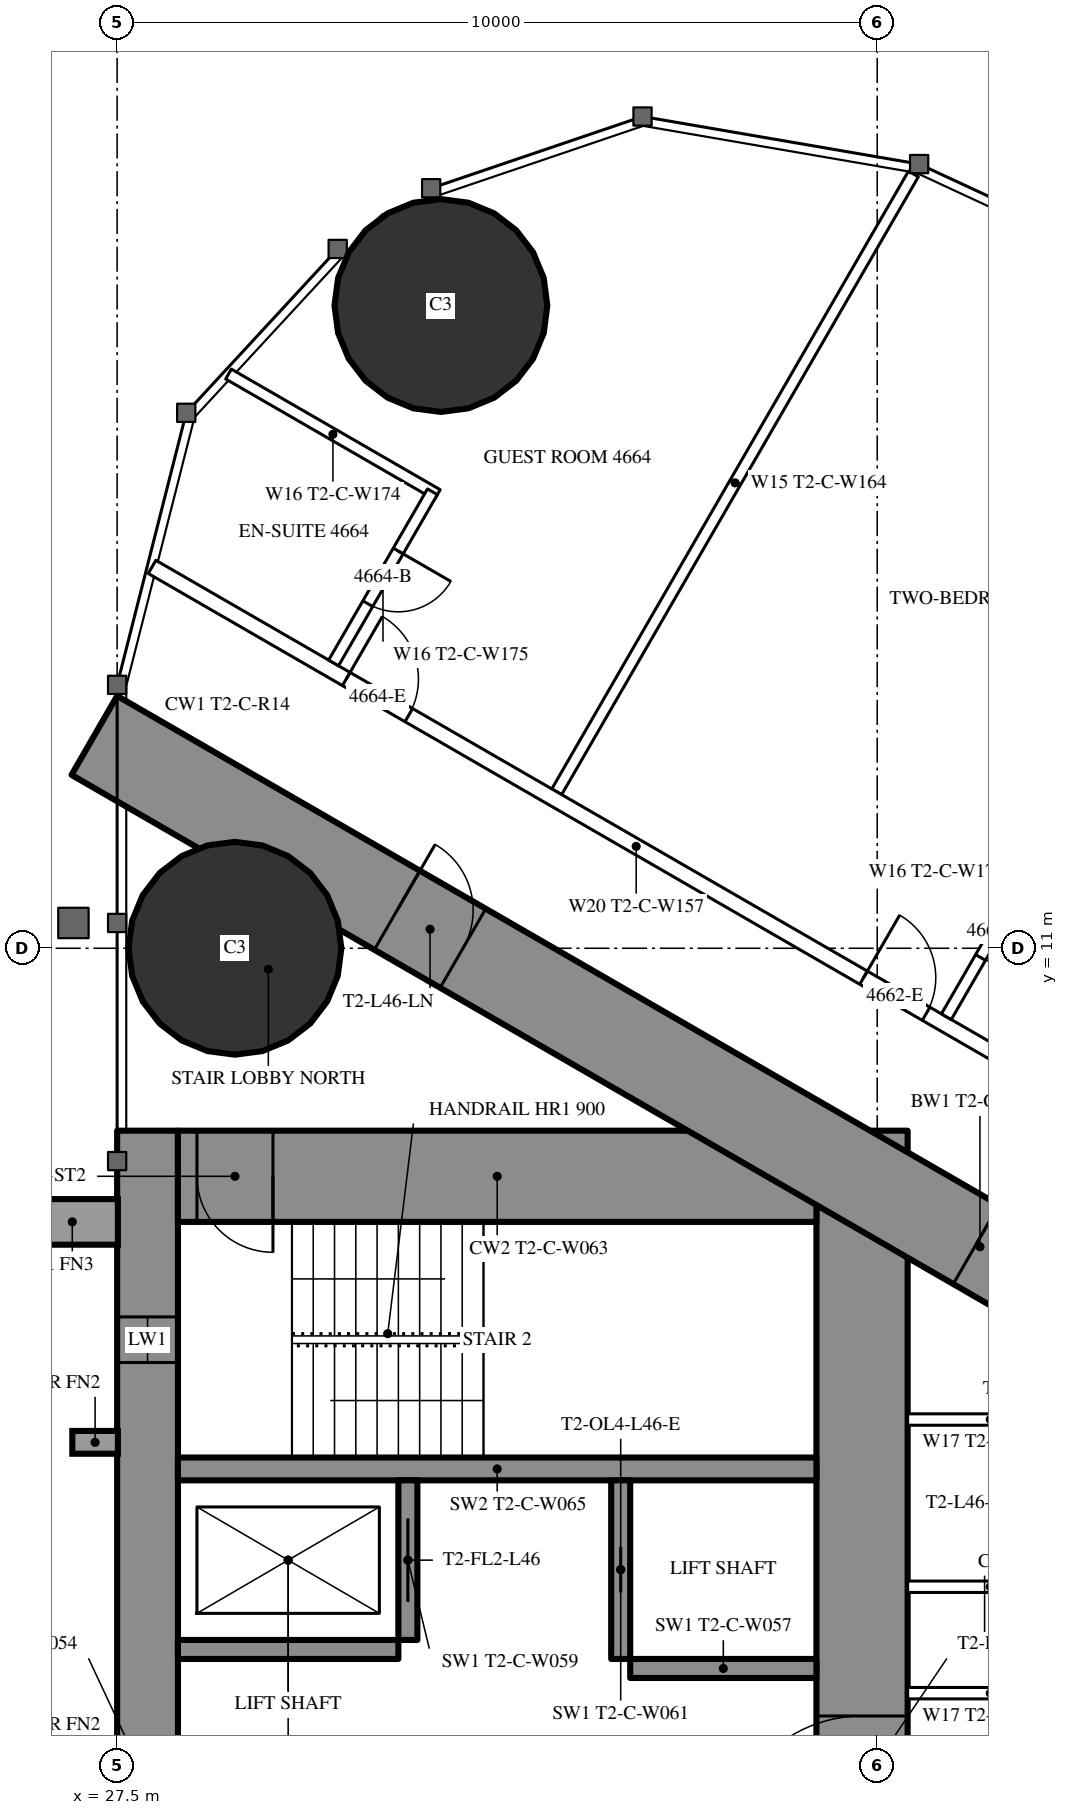
"""IFC4 building model, lengths in metres.
Left out: names, types, materials, properties, quantities, classifications, styles, units other than length and angle.
Written with IfcOpenShell. Run it as: python <this file> out.ifc"""

import sys

from ifc_helpers import new_model, si_unit, direction, frame, frame_2d, origin, origin_2d, place, context, subcontext, project, spatial, rectangle, circle, extrude, element, fill, save


model = new_model("IFC4")
c1 = context("Model", 3, precision=1e-05, world=origin(), true_north=direction((0.0, 1.0)))
c2 = subcontext(c1, "Body", "Model", "MODEL_VIEW")
j1 = project(units=[si_unit("LENGTHUNIT", "METRE"), si_unit("PLANEANGLEUNIT", "RADIAN")], contexts=[c1])
p1 = place(None, origin())
s1 = spatial("IfcSite", under=j1, at=p1, CompositionType="ELEMENT")
p2 = place(p1, origin())
s2 = spatial("IfcBuilding", under=s1, at=p2, CompositionType="ELEMENT")
p3 = place(p2, frame((0.0, 0.0, 173.8)))
s3 = spatial("IfcBuildingStorey", under=s2, at=p3, CompositionType="ELEMENT", Elevation=173.8)
for number, where, z_axis, x_axis in (
    (1, (31.76, 19.456, 0.0), (0.0, 0.0, 1.0), (1.0, 0.0, 0.0)),
    (2, (29.05, 11.0, 0.0), (0.0, 0.0, 1.0), (1.0, 0.0, 0.0)),
):
    element("IfcColumn", number, at=place(p3, frame(where, z_axis=z_axis, x_axis=x_axis)), inside=s3, PredefinedType="COLUMN", context=c2, shape_type="SweptSolid", body=[
        extrude(circle(Radius=1.4, at=origin_2d()), origin(), (0.0, 0.0, 1.0), 3.5),
    ])
p4 = place(p3, frame((27.9, -8.6, 0.0), z_axis=(0.0, 0.0, 1.0), x_axis=(0.0, 1.0, 0.0)))
e3 = element("IfcWall", 3, at=p4, inside=s3, PredefinedType="SHEAR", context=c2, shape_type="SweptSolid", body=[
    extrude(rectangle(XDim=17.2, YDim=0.8, at=frame_2d((8.6, 0.0))), origin(), (0.0, 0.0, 1.0), 3.5),
])
p5 = place(p4, frame((2.45, 0.0, 0.6)))
e4 = element("IfcOpeningElement", 4, at=p5, cuts=e3, PredefinedType="OPENING", context=c2, shape_type="SweptSolid", body=[
    extrude(rectangle(XDim=0.6, YDim=2.1, at=frame_2d((0.3, 1.05))), frame((0.0, 0.41, 0.0), z_axis=(0.0, -1.0, 0.0), x_axis=(1.0, 0.0, 0.0)), (0.0, 0.0, 1.0), 0.82),
])
p6 = place(p4, frame((14.15, 0.0, 0.6)))
e5 = element("IfcOpeningElement", 5, at=p6, cuts=e3, PredefinedType="OPENING", context=c2, shape_type="SweptSolid", body=[
    extrude(rectangle(XDim=0.6, YDim=2.1, at=frame_2d((0.3, 1.05))), frame((0.0, 0.41, 0.0), z_axis=(0.0, -1.0, 0.0), x_axis=(1.0, 0.0, 0.0)), (0.0, 0.0, 1.0), 0.82),
])
p7 = place(p3, frame((37.3, -8.6, 0.0), z_axis=(0.0, 0.0, 1.0), x_axis=(0.0, 1.0, 0.0)))
e6 = element("IfcWall", 6, at=p7, inside=s3, PredefinedType="SHEAR", context=c2, shape_type="SweptSolid", body=[
    extrude(rectangle(XDim=17.2, YDim=1.2, at=frame_2d((8.6, 0.0))), origin(), (0.0, 0.0, 1.0), 3.5),
])
p8 = place(p7, frame((7.7, 0.0, 0.0)))
e7 = element("IfcOpeningElement", 7, at=p8, cuts=e6, PredefinedType="OPENING", context=c2, shape_type="SweptSolid", body=[
    extrude(rectangle(XDim=1.8, YDim=2.2, at=frame_2d((0.9, 1.1))), frame((0.0, 0.61, 0.0), z_axis=(0.0, -1.0, 0.0), x_axis=(1.0, 0.0, 0.0)), (0.0, 0.0, 1.0), 1.22),
])
p9 = place(p3, frame((28.3, 8.0, 0.0), z_axis=(0.0, 0.0, 1.0), x_axis=(1.0, 0.0, 0.0)))
e8 = element("IfcWall", 8, at=p9, inside=s3, PredefinedType="SHEAR", context=c2, shape_type="SweptSolid", body=[
    extrude(rectangle(XDim=8.4, YDim=1.2, at=frame_2d((4.2, 0.0))), origin(), (0.0, 0.0, 1.0), 3.5),
])
p10 = place(p9, frame((0.25, 0.0, 0.0)))
e9 = element("IfcOpeningElement", 9, at=p10, cuts=e8, PredefinedType="OPENING", context=c2, shape_type="SweptSolid", body=[
    extrude(rectangle(XDim=1.0, YDim=2.2, at=frame_2d((0.5, 1.1))), frame((0.0, 0.61, 0.0), z_axis=(0.0, -1.0, 0.0), x_axis=(1.0, 0.0, 0.0)), (0.0, 0.0, 1.0), 1.22),
])
p11 = place(p3, frame((28.3, 4.15, 0.0), z_axis=(0.0, 0.0, 1.0), x_axis=(1.0, 0.0, 0.0)))
e10 = element("IfcWall", 10, at=p11, inside=s3, PredefinedType="SHEAR", context=c2, shape_type="SweptSolid", body=[
    extrude(rectangle(XDim=8.4, YDim=0.3, at=frame_2d((4.2, 0.0))), origin(), (0.0, 0.0, 1.0), 3.5),
])
p12 = place(p3, frame((31.325, 1.9, 0.0), z_axis=(0.0, 0.0, 1.0), x_axis=(0.0, 1.0, 0.0)))
e11 = element("IfcWall", 11, at=p12, inside=s3, PredefinedType="SHEAR", context=c2, shape_type="SweptSolid", body=[
    extrude(rectangle(XDim=2.1, YDim=0.25, at=frame_2d((1.05, 0.0))), origin(), (0.0, 0.0, 1.0), 3.5),
])
p13 = place(p12, frame((0.5, 0.0, 0.0)))
e12 = element("IfcOpeningElement", 12, at=p13, cuts=e11, PredefinedType="OPENING", context=c2, shape_type="SweptSolid", body=[
    extrude(rectangle(XDim=1.1, YDim=2.2, at=frame_2d((0.55, 1.1))), frame((0.0, 0.135, 0.0), z_axis=(0.0, -1.0, 0.0), x_axis=(1.0, 0.0, 0.0)), (0.0, 0.0, 1.0), 0.27),
])
p14 = place(p3, frame((34.125, 1.65, 0.0), z_axis=(0.0, 0.0, 1.0), x_axis=(0.0, 1.0, 0.0)))
e13 = element("IfcWall", 13, at=p14, inside=s3, PredefinedType="SHEAR", context=c2, shape_type="SweptSolid", body=[
    extrude(rectangle(XDim=2.35, YDim=0.25, at=frame_2d((1.175, 0.0))), origin(), (0.0, 0.0, 1.0), 3.5),
])
p15 = place(p14, frame((0.875, 0.0, 0.0)))
e14 = element("IfcOpeningElement", 14, at=p15, cuts=e13, PredefinedType="OPENING", context=c2, shape_type="SweptSolid", body=[
    extrude(rectangle(XDim=0.6, YDim=2.0, at=frame_2d((0.3, 1.0))), frame((0.0, 0.135, 0.0), z_axis=(0.0, -1.0, 0.0), x_axis=(1.0, 0.0, 0.0)), (0.0, 0.0, 1.0), 0.27),
])
p16 = place(p3, frame((28.3, 1.775, 0.0), z_axis=(0.0, 0.0, 1.0), x_axis=(1.0, 0.0, 0.0)))
e15 = element("IfcWall", 15, at=p16, inside=s3, PredefinedType="SHEAR", context=c2, shape_type="SweptSolid", body=[
    extrude(rectangle(XDim=2.9, YDim=0.25, at=frame_2d((1.45, 0.0))), origin(), (0.0, 0.0, 1.0), 3.5),
])
p17 = place(p3, frame((34.25, 1.525, 0.0), z_axis=(0.0, 0.0, 1.0), x_axis=(1.0, 0.0, 0.0)))
e16 = element("IfcWall", 16, at=p17, inside=s3, PredefinedType="SHEAR", context=c2, shape_type="SweptSolid", body=[
    extrude(rectangle(XDim=2.45, YDim=0.25, at=frame_2d((1.225, 0.0))), origin(), (0.0, 0.0, 1.0), 3.5),
])
p18 = place(p3, frame((27.2, -13.8, 0.0), z_axis=(0.0, 0.0, 1.0), x_axis=(0.866027159892, 0.499996958321, 0.0)))
e17 = element("IfcWall", 17, at=p18, inside=s3, PredefinedType="SHEAR", context=c2, shape_type="SweptSolid", body=[
    extrude(rectangle(XDim=27.947, YDim=1.2, at=frame_2d((13.973, 0.0))), origin(), (0.0, 0.0, 1.0), 3.5),
])
p19 = place(p18, frame((4.6, 0.0, 0.0)))
e18 = element("IfcOpeningElement", 18, at=p19, cuts=e17, PredefinedType="OPENING", context=c2, shape_type="SweptSolid", body=[
    extrude(rectangle(XDim=1.0, YDim=2.2, at=frame_2d((0.5, 1.1))), frame((0.0, 0.61, 0.0), z_axis=(0.0, -1.0, 0.0), x_axis=(1.0, 0.0, 0.0)), (0.0, 0.0, 1.0), 1.22),
])
p20 = place(p18, frame((13.395, 0.0, 0.0)))
e19 = element("IfcOpeningElement", 19, at=p20, cuts=e17, PredefinedType="OPENING", context=c2, shape_type="SweptSolid", body=[
    extrude(rectangle(XDim=1.8, YDim=2.2, at=frame_2d((0.9, 1.1))), frame((0.0, 0.61, 0.0), z_axis=(0.0, -1.0, 0.0), x_axis=(1.0, 0.0, 0.0)), (0.0, 0.0, 1.0), 1.22),
])
p21 = place(p3, frame((27.2, 13.8, 0.0), z_axis=(0.0, 0.0, 1.0), x_axis=(0.866024515034, -0.500001539357, 0.0)))
e20 = element("IfcWall", 20, at=p21, inside=s3, PredefinedType="SHEAR", context=c2, shape_type="SweptSolid", body=[
    extrude(rectangle(XDim=26.907, YDim=1.2, at=frame_2d((13.454, 0.0))), origin(), (0.0, 0.0, 1.0), 3.5),
])
p22 = place(p21, frame((4.6, 0.0, 0.0)))
e21 = element("IfcOpeningElement", 21, at=p22, cuts=e20, PredefinedType="OPENING", context=c2, shape_type="SweptSolid", body=[
    extrude(rectangle(XDim=1.0, YDim=2.2, at=frame_2d((0.5, 1.1))), frame((0.0, 0.61, 0.0), z_axis=(0.0, -1.0, 0.0), x_axis=(1.0, 0.0, 0.0)), (0.0, 0.0, 1.0), 1.22),
])
p23 = place(p21, frame((13.395, 0.0, 0.0)))
e22 = element("IfcOpeningElement", 22, at=p23, cuts=e20, PredefinedType="OPENING", context=c2, shape_type="SweptSolid", body=[
    extrude(rectangle(XDim=1.8, YDim=2.2, at=frame_2d((0.9, 1.1))), frame((0.0, 0.61, 0.0), z_axis=(0.0, -1.0, 0.0), x_axis=(1.0, 0.0, 0.0)), (0.0, 0.0, 1.0), 1.22),
])
p24 = place(p3, frame((33.284, 13.059, 0.0), z_axis=(0.0, 0.0, 1.0), x_axis=(0.499985904184, 0.866033541855, 0.0)))
e23 = element("IfcWall", 23, at=p24, inside=s3, PredefinedType="PARTITIONING", context=c2, shape_type="SweptSolid", body=[
    extrude(rectangle(XDim=9.385, YDim=0.15, at=frame_2d((4.693, 0.0))), origin(), (0.0, 0.0, 1.0), 3.25),
])
p25 = place(p3, frame((27.959, 16.017, 0.0), z_axis=(0.0, 0.0, 1.0), x_axis=(0.866024165033, -0.500002145574, 0.0)))
e24 = element("IfcWall", 24, at=p25, inside=s3, PredefinedType="PARTITIONING", context=c2, shape_type="SweptSolid", body=[
    extrude(rectangle(XDim=14.709, YDim=0.2, at=frame_2d((7.354, 0.0))), origin(), (0.0, 0.0, 1.0), 3.25),
])
p26 = place(p25, frame((10.809, 0.0, 0.0)))
e25 = element("IfcOpeningElement", 25, at=p26, cuts=e24, PredefinedType="OPENING", context=c2, shape_type="SweptSolid", body=[
    extrude(rectangle(XDim=0.95, YDim=2.2, at=frame_2d((0.475, 1.1))), frame((0.0, 0.11, 0.0), z_axis=(0.0, -1.0, 0.0), x_axis=(1.0, 0.0, 0.0)), (0.0, 0.0, 1.0), 0.22),
])
p27 = place(p25, frame((2.95, 0.0, 0.0)))
e26 = element("IfcOpeningElement", 26, at=p27, cuts=e24, PredefinedType="OPENING", context=c2, shape_type="SweptSolid", body=[
    extrude(rectangle(XDim=0.95, YDim=2.2, at=frame_2d((0.475, 1.1))), frame((0.0, 0.11, 0.0), z_axis=(0.0, -1.0, 0.0), x_axis=(1.0, 0.0, 0.0)), (0.0, 0.0, 1.0), 0.22),
])
p28 = place(p3, frame((38.409, 10.099, 0.0), z_axis=(0.0, 0.0, 1.0), x_axis=(0.500006934395, 0.866021400173, 0.0)))
e27 = element("IfcWall", 27, at=p28, inside=s3, PredefinedType="PARTITIONING", context=c2, shape_type="SweptSolid", body=[
    extrude(rectangle(XDim=2.6, YDim=0.15, at=frame_2d((1.3, 0.0))), origin(), (0.0, 0.0, 1.0), 3.25),
])
p29 = place(p28, frame((0.9, 0.0, 0.0)))
e28 = element("IfcOpeningElement", 28, at=p29, cuts=e27, PredefinedType="OPENING", context=c2, shape_type="SweptSolid", body=[
    extrude(rectangle(XDim=0.8, YDim=2.2, at=frame_2d((0.4, 1.1))), frame((0.0, 0.085, 0.0), z_axis=(0.0, -1.0, 0.0), x_axis=(1.0, 0.0, 0.0)), (0.0, 0.0, 1.0), 0.17),
])
p30 = place(p3, frame((28.965, 18.554, 0.0), z_axis=(0.0, 0.0, 1.0), x_axis=(0.866008740531, -0.500028860491, 0.0)))
e29 = element("IfcWall", 29, at=p30, inside=s3, PredefinedType="PARTITIONING", context=c2, shape_type="SweptSolid", body=[
    extrude(rectangle(XDim=3.173, YDim=0.15, at=frame_2d((1.586, 0.0))), origin(), (0.0, 0.0, 1.0), 3.25),
])
p31 = place(p3, frame((30.348, 14.754, 0.0), z_axis=(0.0, 0.0, 1.0), x_axis=(0.500006934395, 0.866021400173, 0.0)))
e30 = element("IfcWall", 30, at=p31, inside=s3, PredefinedType="PARTITIONING", context=c2, shape_type="SweptSolid", body=[
    extrude(rectangle(XDim=2.6, YDim=0.15, at=frame_2d((1.3, 0.0))), origin(), (0.0, 0.0, 1.0), 2.3),
])
p32 = place(p31, frame((0.9, 0.0, 0.0)))
e31 = element("IfcOpeningElement", 31, at=p32, cuts=e30, PredefinedType="OPENING", context=c2, shape_type="SweptSolid", body=[
    extrude(rectangle(XDim=0.8, YDim=2.2, at=frame_2d((0.4, 1.1))), frame((0.0, 0.085, 0.0), z_axis=(0.0, -1.0, 0.0), x_axis=(1.0, 0.0, 0.0)), (0.0, 0.0, 1.0), 0.17),
])
for number, where, z_axis, x_axis in (
    (32, (37.9, 1.2, 0.0), (0.0, 0.0, 1.0), (1.0, 0.0, 0.0)),
    (33, (37.9, 2.6, 0.0), (0.0, 0.0, 1.0), (1.0, 0.0, 0.0)),
    (34, (37.9, 4.8, 0.0), (0.0, 0.0, 1.0), (1.0, 0.0, 0.0)),
):
    element("IfcWall", number, at=place(p3, frame(where, z_axis=z_axis, x_axis=x_axis)), inside=s3, PredefinedType="PARTITIONING", context=c2, shape_type="SweptSolid", body=[
        extrude(rectangle(XDim=2.175, YDim=0.15, at=frame_2d((1.087, 0.0))), origin(), (0.0, 0.0, 1.0), 3.25),
    ])
p33 = place(p29, origin())
e35 = element("IfcDoor", 35, at=p33, inside=s3, OperationType="SINGLE_SWING_RIGHT", PredefinedType="DOOR", context=c2, shape_type="SweptSolid", body=[
    extrude(rectangle(XDim=0.8, YDim=2.2, at=frame_2d((0.4, 1.1))), frame((0.0, 0.025, 0.0), z_axis=(0.0, -1.0, 0.0), x_axis=(1.0, 0.0, 0.0)), (0.0, 0.0, 1.0), 0.05),
])
fill(e28, e35)
p34 = place(p26, origin())
e36 = element("IfcDoor", 36, at=p34, inside=s3, OperationType="SINGLE_SWING_LEFT", PredefinedType="DOOR", context=c2, shape_type="SweptSolid", body=[
    extrude(rectangle(XDim=0.95, YDim=2.2, at=frame_2d((0.475, 1.1))), frame((0.0, 0.025, 0.0), z_axis=(0.0, -1.0, 0.0), x_axis=(1.0, 0.0, 0.0)), (0.0, 0.0, 1.0), 0.05),
])
fill(e25, e36)
p35 = place(p32, origin())
e37 = element("IfcDoor", 37, at=p35, inside=s3, OperationType="SINGLE_SWING_RIGHT", PredefinedType="DOOR", context=c2, shape_type="SweptSolid", body=[
    extrude(rectangle(XDim=0.8, YDim=2.2, at=frame_2d((0.4, 1.1))), frame((0.0, 0.025, 0.0), z_axis=(0.0, -1.0, 0.0), x_axis=(1.0, 0.0, 0.0)), (0.0, 0.0, 1.0), 0.05),
])
fill(e31, e37)
p36 = place(p27, origin())
e38 = element("IfcDoor", 38, at=p36, inside=s3, OperationType="SINGLE_SWING_LEFT", PredefinedType="DOOR", context=c2, shape_type="SweptSolid", body=[
    extrude(rectangle(XDim=0.95, YDim=2.2, at=frame_2d((0.475, 1.1))), frame((0.0, 0.025, 0.0), z_axis=(0.0, -1.0, 0.0), x_axis=(1.0, 0.0, 0.0)), (0.0, 0.0, 1.0), 0.05),
])
fill(e26, e38)
p37 = place(p22, origin())
e39 = element("IfcDoor", 39, at=p37, inside=s3, OperationType="SINGLE_SWING_LEFT", PredefinedType="DOOR", context=c2, shape_type="SweptSolid", body=[
    extrude(rectangle(XDim=1.0, YDim=2.2, at=frame_2d((0.5, 1.1))), frame((0.0, 0.025, 0.0), z_axis=(0.0, -1.0, 0.0), x_axis=(1.0, 0.0, 0.0)), (0.0, 0.0, 1.0), 0.05),
])
fill(e21, e39)
p38 = place(p23, origin())
e40 = element("IfcDoor", 40, at=p38, inside=s3, OperationType="DOUBLE_DOOR_SINGLE_SWING", PredefinedType="DOOR", context=c2, shape_type="SweptSolid", body=[
    extrude(rectangle(XDim=1.8, YDim=2.2, at=frame_2d((0.9, 1.1))), frame((0.0, 0.025, 0.0), z_axis=(0.0, -1.0, 0.0), x_axis=(1.0, 0.0, 0.0)), (0.0, 0.0, 1.0), 0.05),
])
fill(e22, e40)
p39 = place(p8, origin())
e41 = element("IfcDoor", 41, at=p39, inside=s3, OperationType="DOUBLE_DOOR_SINGLE_SWING", PredefinedType="DOOR", context=c2, shape_type="SweptSolid", body=[
    extrude(rectangle(XDim=1.8, YDim=2.2, at=frame_2d((0.9, 1.1))), frame((0.0, 0.025, 0.0), z_axis=(0.0, -1.0, 0.0), x_axis=(1.0, 0.0, 0.0)), (0.0, 0.0, 1.0), 0.05),
])
fill(e7, e41)
p40 = place(p10, origin())
e42 = element("IfcDoor", 42, at=p40, inside=s3, OperationType="SINGLE_SWING_RIGHT", PredefinedType="DOOR", context=c2, shape_type="SweptSolid", body=[
    extrude(rectangle(XDim=1.0, YDim=2.2, at=frame_2d((0.5, 1.1))), frame((0.0, 0.025, 0.0), z_axis=(0.0, -1.0, 0.0), x_axis=(1.0, 0.0, 0.0)), (0.0, 0.0, 1.0), 0.05),
])
fill(e9, e42)
p41 = place(p13, origin())
e43 = element("IfcDoor", 43, at=p41, inside=s3, OperationType="SLIDING_TO_LEFT", PredefinedType="USERDEFINED", context=c2, shape_type="SweptSolid", body=[
    extrude(rectangle(XDim=1.1, YDim=2.2, at=frame_2d((0.55, 1.1))), frame((0.0, 0.025, 0.0), z_axis=(0.0, -1.0, 0.0), x_axis=(1.0, 0.0, 0.0)), (0.0, 0.0, 1.0), 0.05),
])
fill(e12, e43)
p42 = place(p15, origin())
e44 = element("IfcDoor", 44, at=p42, inside=s3, OperationType="SLIDING_TO_LEFT", PredefinedType="DOOR", context=c2, shape_type="SweptSolid", body=[
    extrude(rectangle(XDim=0.6, YDim=2.0, at=frame_2d((0.3, 1.0))), frame((0.0, 0.025, 0.0), z_axis=(0.0, -1.0, 0.0), x_axis=(1.0, 0.0, 0.0)), (0.0, 0.0, 1.0), 0.05),
])
fill(e14, e44)
p43 = place(p6, origin())
e45 = element("IfcWindow", 45, at=p43, inside=s3, PartitioningType="SINGLE_PANEL", PredefinedType="WINDOW", context=c2, shape_type="SweptSolid", body=[
    extrude(rectangle(XDim=0.6, YDim=2.1, at=frame_2d((0.3, 1.05))), frame((0.0, 0.03, 0.0), z_axis=(0.0, -1.0, 0.0), x_axis=(1.0, 0.0, 0.0)), (0.0, 0.0, 1.0), 0.06),
])
fill(e5, e45)
save(model, sys.argv[1])
